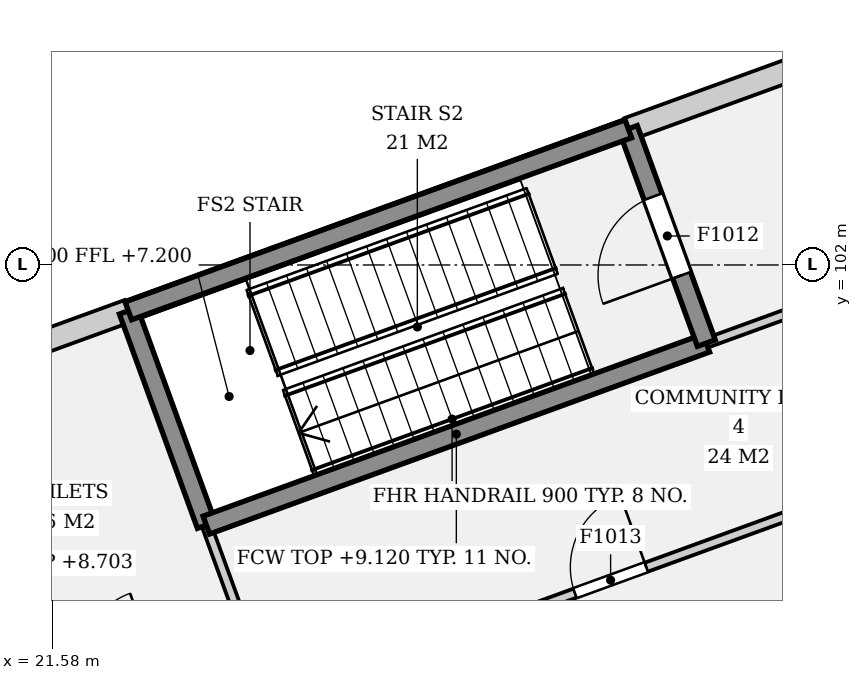
"""IFC4 building model, lengths in metres.
Left out: names, types, materials, properties, quantities, classifications, styles, units other than length and angle.
Written with IfcOpenShell. Run it as: python <this file> out.ifc"""

import sys

from ifc_helpers import new_model, si_unit, direction, frame, frame_2d, origin, place, context, subcontext, project, spatial, rectangle, extrude, element, fill, save


model = new_model("IFC4")
c1 = context("Model", 3, precision=1e-05, world=origin(), true_north=direction((0.0, 1.0)))
c2 = subcontext(c1, "Body", "Model", "MODEL_VIEW")
j1 = project(units=[si_unit("LENGTHUNIT", "METRE"), si_unit("PLANEANGLEUNIT", "RADIAN")], contexts=[c1])
p1 = place(None, origin())
s1 = spatial("IfcSite", under=j1, at=p1, CompositionType="ELEMENT")
p2 = place(p1, origin())
s2 = spatial("IfcBuilding", under=s1, at=p2, CompositionType="ELEMENT")
p3 = place(p2, frame((0.0, 0.0, 5.0)))
s3 = spatial("IfcBuildingStorey", under=s2, at=p3, CompositionType="ELEMENT", Elevation=5.0)
p4 = place(p3, frame((23.606, 98.578, 0.0), z_axis=(0.0, 0.0, 1.0), x_axis=(-0.342037080957, 0.939686455819, 0.0)))
e1 = element("IfcWall", 1, at=p4, inside=s3, PredefinedType="SOLIDWALL", context=c2, shape_type="SweptSolid", body=[
    extrude(rectangle(XDim=3.0, YDim=0.25, at=frame_2d((1.5, 0.0))), origin(), (0.0, 0.0, 1.0), 4.12),
])
p5 = place(p3, frame((23.606, 98.578, 0.0), z_axis=(0.0, 0.0, 1.0), x_axis=(0.939693585395, 0.342017493073, 0.0)))
e2 = element("IfcWall", 2, at=p5, inside=s3, PredefinedType="SOLIDWALL", context=c2, shape_type="SweptSolid", body=[
    extrude(rectangle(XDim=7.0, YDim=0.25, at=frame_2d((3.5, 0.0))), origin(), (0.0, 0.0, 1.0), 4.12),
])
p6 = place(p3, frame((30.184, 100.972, 0.0), z_axis=(0.0, 0.0, 1.0), x_axis=(-0.341965219194, 0.939712609717, 0.0)))
e3 = element("IfcWall", 3, at=p6, inside=s3, PredefinedType="SOLIDWALL", context=c2, shape_type="SweptSolid", body=[
    extrude(rectangle(XDim=3.0, YDim=0.25, at=frame_2d((1.5, 0.0))), origin(), (0.0, 0.0, 1.0), 4.12),
])
p7 = place(p6, frame((0.95, 0.0, 0.0)))
e4 = element("IfcOpeningElement", 4, at=p7, cuts=e3, PredefinedType="OPENING", context=c2, shape_type="SweptSolid", body=[
    extrude(rectangle(XDim=1.1, YDim=2.1, at=frame_2d((0.55, 1.05))), frame((0.0, 0.135, 0.0), z_axis=(0.0, -1.0, 0.0), x_axis=(1.0, 0.0, 0.0)), (0.0, 0.0, 1.0), 0.27),
])
p8 = place(p3, frame((29.158, 103.791, 0.0), z_axis=(0.0, 0.0, 1.0), x_axis=(-0.939697665127, -0.342006283793, 0.0)))
e5 = element("IfcWall", 5, at=p8, inside=s3, PredefinedType="SOLIDWALL", context=c2, shape_type="SweptSolid", body=[
    extrude(rectangle(XDim=7.0, YDim=0.25, at=frame_2d((3.5, 0.0))), origin(), (0.0, 0.0, 1.0), 4.12),
])
p9 = place(p3, frame((31.507, 104.646, 0.0), z_axis=(0.0, 0.0, 1.0), x_axis=(-0.939696437289, -0.342009657388, 0.0)))
e6 = element("IfcWall", 6, at=p9, inside=s3, PredefinedType="ELEMENTEDWALL", context=c2, shape_type="SweptSolid", body=[
    extrude(rectangle(XDim=2.5, YDim=0.3, at=frame_2d((1.25, 0.0))), origin(), (0.0, 0.0, 1.0), 3.703),
])
p10 = place(p3, frame((22.58, 101.397, 0.0), z_axis=(0.0, 0.0, 1.0), x_axis=(-0.939693585395, -0.342017493073, 0.0)))
e7 = element("IfcWall", 7, at=p10, inside=s3, PredefinedType="ELEMENTEDWALL", context=c2, shape_type="SweptSolid", body=[
    extrude(rectangle(XDim=3.5, YDim=0.3, at=frame_2d((1.75, 0.0))), origin(), (0.0, 0.0, 1.0), 3.703),
])
p11 = place(p3, frame((24.461, 96.229, 0.0), z_axis=(0.0, 0.0, 1.0), x_axis=(0.939689082478, 0.342029864589, 0.0)))
e8 = element("IfcWall", 8, at=p11, inside=s3, PredefinedType="PARTITIONING", context=c2, shape_type="SweptSolid", body=[
    extrude(rectangle(XDim=9.5, YDim=0.125, at=frame_2d((4.75, 0.0))), origin(), (0.0, 0.0, 1.0), 3.587),
])
p12 = place(p11, frame((4.25, 0.0, 0.0)))
e9 = element("IfcOpeningElement", 9, at=p12, cuts=e8, PredefinedType="OPENING", context=c2, shape_type="SweptSolid", body=[
    extrude(rectangle(XDim=1.0, YDim=2.1, at=frame_2d((0.5, 1.05))), frame((0.0, 0.073, 0.0), z_axis=(0.0, -1.0, 0.0), x_axis=(1.0, 0.0, 0.0)), (0.0, 0.0, 1.0), 0.145),
])
p13 = place(p3, frame((24.119, 97.168, 0.0), z_axis=(0.0, 0.0, 1.0), x_axis=(-0.341939069183, 0.9397221254, 0.0)))
e10 = element("IfcWall", 10, at=p13, inside=s3, PredefinedType="PARTITIONING", context=c2, shape_type="SweptSolid", body=[
    extrude(rectangle(XDim=1.5, YDim=0.125, at=frame_2d((0.75, 0.0))), origin(), (0.0, 0.0, 1.0), 3.587),
])
p14 = place(p3, frame((30.184, 100.972, 0.0), z_axis=(0.0, 0.0, 1.0), x_axis=(0.939707859211, 0.341978273195, 0.0)))
e11 = element("IfcWall", 11, at=p14, inside=s3, PredefinedType="PARTITIONING", context=c2, shape_type="SweptSolid", body=[
    extrude(rectangle(XDim=2.5, YDim=0.125, at=frame_2d((1.25, 0.0))), origin(), (0.0, 0.0, 1.0), 3.587),
])
p15 = place(p7, origin())
e12 = element("IfcDoor", 12, at=p15, inside=s3, OperationType="SINGLE_SWING_LEFT", PredefinedType="DOOR", context=c2, shape_type="SweptSolid", body=[
    extrude(rectangle(XDim=1.1, YDim=2.1, at=frame_2d((0.55, 1.05))), frame((0.0, 0.025, 0.0), z_axis=(0.0, -1.0, 0.0), x_axis=(1.0, 0.0, 0.0)), (0.0, 0.0, 1.0), 0.05),
])
fill(e4, e12)
p16 = place(p12, origin())
e13 = element("IfcDoor", 13, at=p16, inside=s3, OperationType="SINGLE_SWING_RIGHT", PredefinedType="DOOR", context=c2, shape_type="SweptSolid", body=[
    extrude(rectangle(XDim=1.0, YDim=2.1, at=frame_2d((0.5, 1.05))), frame((0.0, 0.025, 0.0), z_axis=(0.0, -1.0, 0.0), x_axis=(1.0, 0.0, 0.0)), (0.0, 0.0, 1.0), 0.05),
])
fill(e9, e13)
save(model, sys.argv[1])
